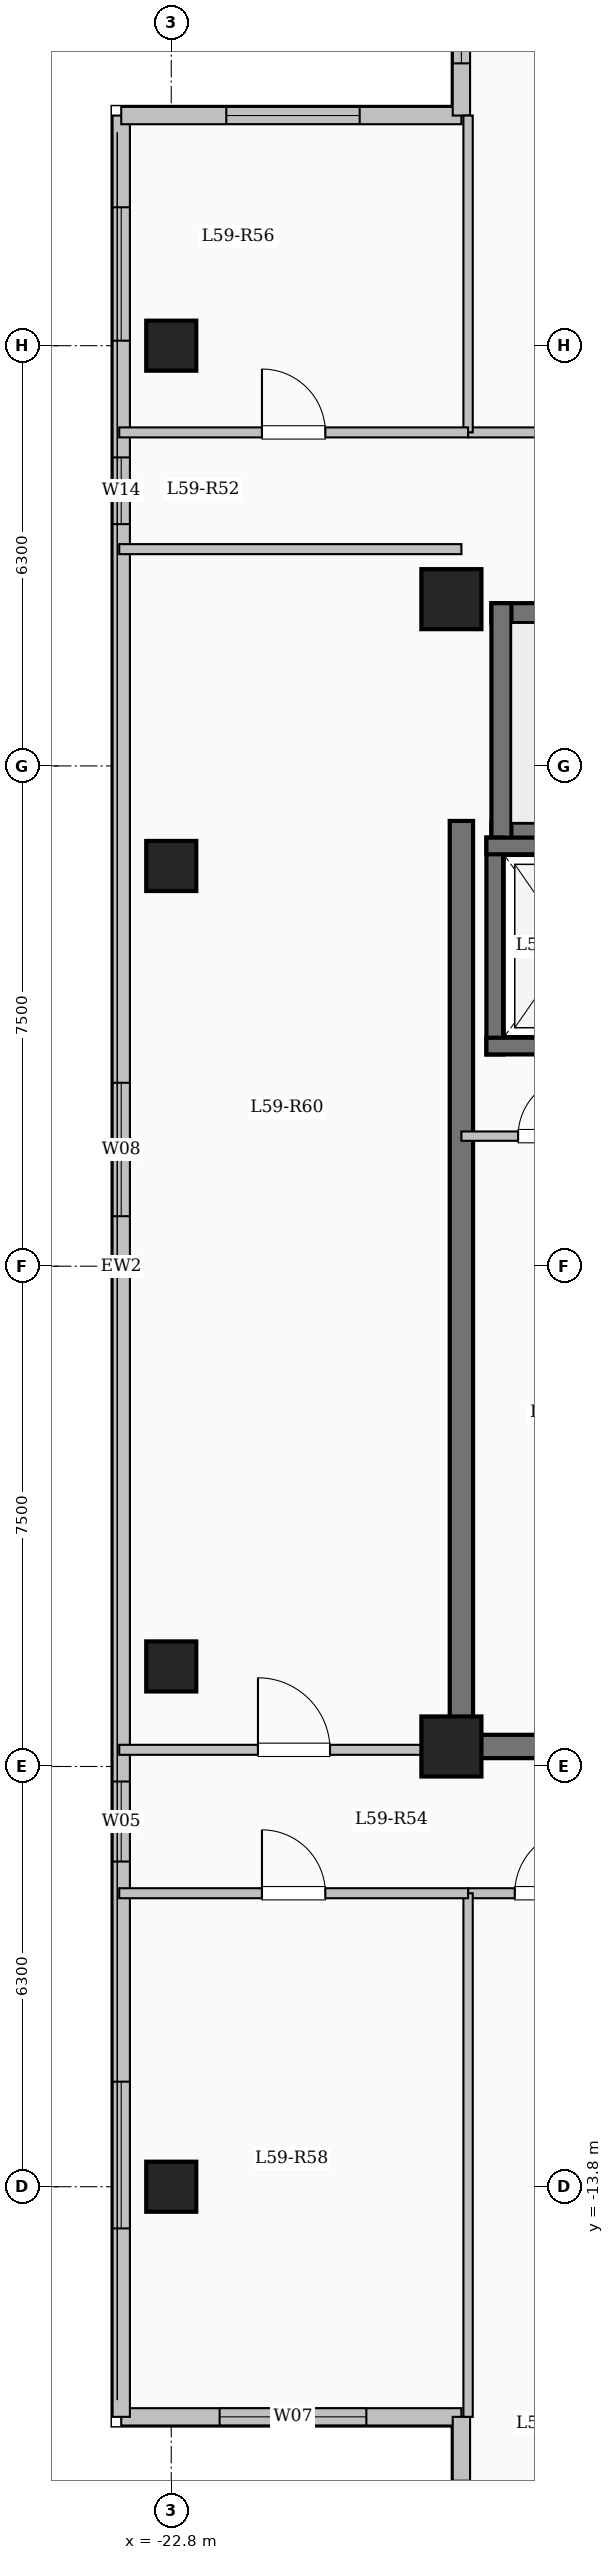
"""IFC4 building model, lengths in metres.
Left out: names, types, materials, properties, quantities, classifications, styles, units other than length and angle.
Written with IfcOpenShell. Run it as: python <this file> out.ifc"""

import sys

from ifc_helpers import new_model, si_unit, direction, frame, frame_2d, origin, origin_2d, place, context, subcontext, project, spatial, rectangle, extrude, element, fill, save


model = new_model("IFC4")
c1 = context("Model", 3, precision=1e-05, world=origin(), true_north=direction((0.0, 1.0)))
c2 = subcontext(c1, "Body", "Model", "MODEL_VIEW")
j1 = project(units=[si_unit("LENGTHUNIT", "METRE"), si_unit("PLANEANGLEUNIT", "RADIAN")], contexts=[c1])
p1 = place(None, origin())
s1 = spatial("IfcSite", under=j1, at=p1, CompositionType="ELEMENT")
p2 = place(p1, origin())
s2 = spatial("IfcBuilding", under=s1, at=p2, CompositionType="ELEMENT")
p3 = place(p2, frame((0.0, 0.0, 217.05)))
s3 = spatial("IfcBuildingStorey", under=s2, at=p3, CompositionType="ELEMENT", Elevation=217.05)
for number, where, z_axis, x_axis in (
    (1, (-18.6, -7.2, 0.0), (0.0, 0.0, 1.0), (1.0, 0.0, 0.0)),
    (2, (-18.6, 10.0, 0.0), (0.0, 0.0, 1.0), (1.0, 0.0, 0.0)),
):
    element("IfcColumn", number, at=place(p3, frame(where, z_axis=z_axis, x_axis=x_axis)), inside=s3, PredefinedType="COLUMN", context=c2, shape_type="SweptSolid", body=[
        extrude(rectangle(XDim=0.9, YDim=0.9, at=origin_2d()), origin(), (0.0, 0.0, 1.0), 3.35),
    ])
for number, where, z_axis, x_axis in (
    (3, (-22.8, -13.8, 0.0), (0.0, 0.0, 1.0), (1.0, 0.0, 0.0)),
    (4, (-22.8, -6.0, 0.0), (0.0, 0.0, 1.0), (1.0, 0.0, 0.0)),
    (5, (-22.8, 6.0, 0.0), (0.0, 0.0, 1.0), (1.0, 0.0, 0.0)),
    (6, (-22.8, 13.8, 0.0), (0.0, 0.0, 1.0), (1.0, 0.0, 0.0)),
):
    element("IfcColumn", number, at=place(p3, frame(where, z_axis=z_axis, x_axis=x_axis)), inside=s3, PredefinedType="COLUMN", context=c2, shape_type="SweptSolid", body=[
        extrude(rectangle(XDim=0.75, YDim=0.75, at=origin_2d()), origin(), (0.0, 0.0, 1.0), 3.35),
    ])
p4 = place(p3, frame((-18.45, -17.25, 0.0), z_axis=(0.0, 0.0, 1.0), x_axis=(-1.0, 0.0, 0.0)))
e7 = element("IfcWall", 7, at=p4, inside=s3, PredefinedType="SOLIDWALL", context=c2, shape_type="SweptSolid", body=[
    extrude(rectangle(XDim=5.1, YDim=0.26, at=frame_2d((2.55, 0.0))), origin(), (0.0, 0.0, 1.0), 3.1),
])
p5 = place(p4, frame((1.425, 0.0, 0.9)))
e8 = element("IfcOpeningElement", 8, at=p5, cuts=e7, PredefinedType="OPENING", context=c2, shape_type="SweptSolid", body=[
    extrude(rectangle(XDim=2.2, YDim=1.75, at=frame_2d((1.1, 0.875))), frame((0.0, 0.14, 0.0), z_axis=(0.0, -1.0, 0.0), x_axis=(1.0, 0.0, 0.0)), (0.0, 0.0, 1.0), 0.28),
])
p6 = place(p3, frame((-23.55, -17.25, 0.0), z_axis=(0.0, 0.0, 1.0), x_axis=(0.0, 1.0, 0.0)))
e9 = element("IfcWall", 9, at=p6, inside=s3, PredefinedType="SOLIDWALL", context=c2, shape_type="SweptSolid", body=[
    extrude(rectangle(XDim=34.5, YDim=0.26, at=frame_2d((17.25, 0.0))), origin(), (0.0, 0.0, 1.0), 3.1),
])
p7 = place(p6, frame((2.825, 0.0, 0.9)))
e10 = element("IfcOpeningElement", 10, at=p7, cuts=e9, PredefinedType="OPENING", context=c2, shape_type="SweptSolid", body=[
    extrude(rectangle(XDim=2.2, YDim=1.75, at=frame_2d((1.1, 0.875))), frame((0.0, 0.14, 0.0), z_axis=(0.0, -1.0, 0.0), x_axis=(1.0, 0.0, 0.0)), (0.0, 0.0, 1.0), 0.28),
])
p8 = place(p6, frame((8.325, 0.0, 0.95)))
e11 = element("IfcOpeningElement", 11, at=p8, cuts=e9, PredefinedType="OPENING", context=c2, shape_type="SweptSolid", body=[
    extrude(rectangle(XDim=1.2, YDim=1.5, at=frame_2d((0.6, 0.75))), frame((0.0, 0.14, 0.0), z_axis=(0.0, -1.0, 0.0), x_axis=(1.0, 0.0, 0.0)), (0.0, 0.0, 1.0), 0.28),
])
p9 = place(p6, frame((18.0, 0.0, 0.9)))
e12 = element("IfcOpeningElement", 12, at=p9, cuts=e9, PredefinedType="OPENING", context=c2, shape_type="SweptSolid", body=[
    extrude(rectangle(XDim=2.0, YDim=1.7, at=frame_2d((1.0, 0.85))), frame((0.0, 0.14, 0.0), z_axis=(0.0, -1.0, 0.0), x_axis=(1.0, 0.0, 0.0)), (0.0, 0.0, 1.0), 0.28),
])
p10 = place(p6, frame((28.375, 0.0, 0.95)))
e13 = element("IfcOpeningElement", 13, at=p10, cuts=e9, PredefinedType="OPENING", context=c2, shape_type="SweptSolid", body=[
    extrude(rectangle(XDim=1.0, YDim=1.5, at=frame_2d((0.5, 0.75))), frame((0.0, 0.14, 0.0), z_axis=(0.0, -1.0, 0.0), x_axis=(1.0, 0.0, 0.0)), (0.0, 0.0, 1.0), 0.28),
])
p11 = place(p6, frame((31.125, 0.0, 0.9)))
e14 = element("IfcOpeningElement", 14, at=p11, cuts=e9, PredefinedType="OPENING", context=c2, shape_type="SweptSolid", body=[
    extrude(rectangle(XDim=2.0, YDim=1.7, at=frame_2d((1.0, 0.85))), frame((0.0, 0.14, 0.0), z_axis=(0.0, -1.0, 0.0), x_axis=(1.0, 0.0, 0.0)), (0.0, 0.0, 1.0), 0.28),
])
p12 = place(p3, frame((-23.55, 17.25, 0.0), z_axis=(0.0, 0.0, 1.0), x_axis=(1.0, 0.0, 0.0)))
e15 = element("IfcWall", 15, at=p12, inside=s3, PredefinedType="SOLIDWALL", context=c2, shape_type="SweptSolid", body=[
    extrude(rectangle(XDim=5.1, YDim=0.26, at=frame_2d((2.55, 0.0))), origin(), (0.0, 0.0, 1.0), 3.1),
])
p13 = place(p12, frame((1.575, 0.0, 0.9)))
e16 = element("IfcOpeningElement", 16, at=p13, cuts=e15, PredefinedType="OPENING", context=c2, shape_type="SweptSolid", body=[
    extrude(rectangle(XDim=2.0, YDim=1.7, at=frame_2d((1.0, 0.85))), frame((0.0, 0.14, 0.0), z_axis=(0.0, -1.0, 0.0), x_axis=(1.0, 0.0, 0.0)), (0.0, 0.0, 1.0), 0.28),
])
p14 = place(p3, frame((-18.45, 17.25, 0.0), z_axis=(0.0, 0.0, 1.0), x_axis=(0.0, 1.0, 0.0)))
e17 = element("IfcWall", 17, at=p14, inside=s3, PredefinedType="SOLIDWALL", context=c2, shape_type="SweptSolid", body=[
    extrude(rectangle(XDim=3.6, YDim=0.26, at=frame_2d((1.8, 0.0))), origin(), (0.0, 0.0, 1.0), 3.1),
])
p15 = place(p14, frame((0.782, 0.0, 0.9)))
e18 = element("IfcOpeningElement", 18, at=p15, cuts=e17, PredefinedType="OPENING", context=c2, shape_type="SweptSolid", body=[
    extrude(rectangle(XDim=2.0, YDim=1.7, at=frame_2d((1.0, 0.85))), frame((0.0, 0.14, 0.0), z_axis=(0.0, -1.0, 0.0), x_axis=(1.0, 0.0, 0.0)), (0.0, 0.0, 1.0), 0.28),
])
p16 = place(p3, frame((-18.45, -20.85, 0.0), z_axis=(0.0, 0.0, 1.0), x_axis=(0.0, 1.0, 0.0)))
e19 = element("IfcWall", 19, at=p16, inside=s3, PredefinedType="SOLIDWALL", context=c2, shape_type="SweptSolid", body=[
    extrude(rectangle(XDim=3.6, YDim=0.26, at=frame_2d((1.8, 0.0))), origin(), (0.0, 0.0, 1.0), 3.1),
])
p17 = place(p16, frame((0.992, 0.0, 0.9)))
e20 = element("IfcOpeningElement", 20, at=p17, cuts=e19, PredefinedType="OPENING", context=c2, shape_type="SweptSolid", body=[
    extrude(rectangle(XDim=1.65, YDim=1.6, at=frame_2d((0.825, 0.8))), frame((0.0, 0.14, 0.0), z_axis=(0.0, -1.0, 0.0), x_axis=(1.0, 0.0, 0.0)), (0.0, 0.0, 1.0), 0.28),
])
p18 = place(p3, frame((-18.0, 9.79, 0.0), z_axis=(0.0, 0.0, 1.0), x_axis=(1.0, 0.0, 0.0)))
e21 = element("IfcWall", 21, at=p18, inside=s3, PredefinedType="SHEAR", context=c2, shape_type="SweptSolid", body=[
    extrude(rectangle(XDim=8.0, YDim=0.3, at=frame_2d((4.0, 0.0))), origin(), (0.0, 0.0, 1.0), 3.35),
])
p19 = place(p3, frame((-18.0, 6.5, 0.0), z_axis=(0.0, 0.0, 1.0), x_axis=(1.0, 0.0, 0.0)))
e22 = element("IfcWall", 22, at=p19, inside=s3, PredefinedType="SHEAR", context=c2, shape_type="SweptSolid", body=[
    extrude(rectangle(XDim=8.0, YDim=0.3, at=frame_2d((4.0, 0.0))), origin(), (0.0, 0.0, 1.0), 3.35),
])
p20 = place(p19, frame((6.45, 0.0, 0.0)))
e23 = element("IfcOpeningElement", 23, at=p20, cuts=e22, PredefinedType="OPENING", context=c2, shape_type="SweptSolid", body=[
    extrude(rectangle(XDim=1.0, YDim=2.15, at=frame_2d((0.5, 1.075))), frame((0.0, 0.16, 0.0), z_axis=(0.0, -1.0, 0.0), x_axis=(1.0, 0.0, 0.0)), (0.0, 0.0, 1.0), 0.32),
])
p21 = place(p3, frame((-17.85, 6.35, 0.0), z_axis=(0.0, 0.0, 1.0), x_axis=(0.0, 1.0, 0.0)))
e24 = element("IfcWall", 24, at=p21, inside=s3, PredefinedType="SHEAR", context=c2, shape_type="SweptSolid", body=[
    extrude(rectangle(XDim=3.59, YDim=0.3, at=frame_2d((1.795, 0.0))), origin(), (0.0, 0.0, 1.0), 3.35),
])
p22 = place(p3, frame((-17.95, 3.175, 0.0), z_axis=(0.0, 0.0, 1.0), x_axis=(0.0, 1.0, 0.0)))
e25 = element("IfcWall", 25, at=p22, inside=s3, PredefinedType="SHEAR", context=c2, shape_type="SweptSolid", body=[
    extrude(rectangle(XDim=3.25, YDim=0.25, at=frame_2d((1.625, 0.0))), origin(), (0.0, 0.0, 1.0), 3.35),
])
for number, where, z_axis, x_axis in (
    (26, (-18.075, 3.3, 0.0), (0.0, 0.0, 1.0), (1.0, 0.0, 0.0)),
    (27, (-18.075, 6.3, 0.0), (0.0, 0.0, 1.0), (1.0, 0.0, 0.0)),
):
    element("IfcWall", number, at=place(p3, frame(where, z_axis=z_axis, x_axis=x_axis)), inside=s3, PredefinedType="SHEAR", context=c2, shape_type="SweptSolid", body=[
        extrude(rectangle(XDim=2.55, YDim=0.25, at=frame_2d((1.275, 0.0))), origin(), (0.0, 0.0, 1.0), 3.35),
    ])
p23 = place(p3, frame((-18.45, -7.375, 0.0), z_axis=(0.0, 0.0, 1.0), x_axis=(0.0, 1.0, 0.0)))
e28 = element("IfcWall", 28, at=p23, inside=s3, PredefinedType="SHEAR", context=c2, shape_type="SweptSolid", body=[
    extrude(rectangle(XDim=14.05, YDim=0.35, at=frame_2d((7.025, 0.0))), origin(), (0.0, 0.0, 1.0), 3.35),
])
p24 = place(p3, frame((-18.625, -7.2, 0.0), z_axis=(0.0, 0.0, 1.0), x_axis=(1.0, 0.0, 0.0)))
e29 = element("IfcWall", 29, at=p24, inside=s3, PredefinedType="SHEAR", context=c2, shape_type="SweptSolid", body=[
    extrude(rectangle(XDim=6.0, YDim=0.35, at=frame_2d((3.0, 0.0))), origin(), (0.0, 0.0, 1.0), 3.35),
])
p25 = place(p24, frame((1.725, 0.0, 0.0)))
e30 = element("IfcOpeningElement", 30, at=p25, cuts=e29, PredefinedType="OPENING", context=c2, shape_type="SweptSolid", body=[
    extrude(rectangle(XDim=1.12, YDim=2.15, at=frame_2d((0.56, 1.075))), frame((0.0, 0.185, 0.0), z_axis=(0.0, -1.0, 0.0), x_axis=(1.0, 0.0, 0.0)), (0.0, 0.0, 1.0), 0.37),
])
p26 = place(p3, frame((-18.45, 1.95, 0.0), z_axis=(0.0, 0.0, 1.0), x_axis=(1.0, 0.0, 0.0)))
e31 = element("IfcWall", 31, at=p26, inside=s3, PredefinedType="PARTITIONING", context=c2, shape_type="SweptSolid", body=[
    extrude(rectangle(XDim=3.15, YDim=0.14, at=frame_2d((1.575, 0.0))), origin(), (0.0, 0.0, 1.0), 3.1),
])
p27 = place(p26, frame((0.85, 0.0, 0.0)))
e32 = element("IfcOpeningElement", 32, at=p27, cuts=e31, PredefinedType="OPENING", context=c2, shape_type="SweptSolid", body=[
    extrude(rectangle(XDim=0.9, YDim=2.08, at=frame_2d((0.45, 1.04))), frame((0.0, 0.08, 0.0), z_axis=(0.0, -1.0, 0.0), x_axis=(1.0, 0.0, 0.0)), (0.0, 0.0, 1.0), 0.16),
])
p28 = place(p3, frame((-18.35, 12.5, 0.0), z_axis=(0.0, 0.0, 1.0), x_axis=(1.0, 0.0, 0.0)))
e33 = element("IfcWall", 33, at=p28, inside=s3, PredefinedType="PARTITIONING", context=c2, shape_type="SweptSolid", body=[
    extrude(rectangle(XDim=14.5, YDim=0.15, at=frame_2d((7.25, 0.0))), origin(), (0.0, 0.0, 1.0), 3.1),
])
p29 = place(p28, frame((2.076, 0.0, 0.0)))
e34 = element("IfcOpeningElement", 34, at=p29, cuts=e33, PredefinedType="OPENING", context=c2, shape_type="SweptSolid", body=[
    extrude(rectangle(XDim=0.95, YDim=2.15, at=frame_2d((0.475, 1.075))), frame((0.0, 0.085, 0.0), z_axis=(0.0, -1.0, 0.0), x_axis=(1.0, 0.0, 0.0)), (0.0, 0.0, 1.0), 0.17),
])
p30 = place(p28, frame((7.269, 0.0, 0.0)))
e35 = element("IfcOpeningElement", 35, at=p30, cuts=e33, PredefinedType="OPENING", context=c2, shape_type="SweptSolid", body=[
    extrude(rectangle(XDim=0.95, YDim=2.15, at=frame_2d((0.475, 1.075))), frame((0.0, 0.085, 0.0), z_axis=(0.0, -1.0, 0.0), x_axis=(1.0, 0.0, 0.0)), (0.0, 0.0, 1.0), 0.17),
])
p31 = place(p28, frame((11.888, 0.0, 0.0)))
e36 = element("IfcOpeningElement", 36, at=p31, cuts=e33, PredefinedType="OPENING", context=c2, shape_type="SweptSolid", body=[
    extrude(rectangle(XDim=0.95, YDim=2.15, at=frame_2d((0.475, 1.075))), frame((0.0, 0.085, 0.0), z_axis=(0.0, -1.0, 0.0), x_axis=(1.0, 0.0, 0.0)), (0.0, 0.0, 1.0), 0.17),
])
p32 = place(p3, frame((-18.35, -9.4, 0.0), z_axis=(0.0, 0.0, 1.0), x_axis=(1.0, 0.0, 0.0)))
e37 = element("IfcWall", 37, at=p32, inside=s3, PredefinedType="PARTITIONING", context=c2, shape_type="SweptSolid", body=[
    extrude(rectangle(XDim=9.8, YDim=0.15, at=frame_2d((4.9, 0.0))), origin(), (0.0, 0.0, 1.0), 3.1),
])
p33 = place(p32, frame((0.7, 0.0, 0.0)))
e38 = element("IfcOpeningElement", 38, at=p33, cuts=e37, PredefinedType="OPENING", context=c2, shape_type="SweptSolid", body=[
    extrude(rectangle(XDim=0.96, YDim=2.15, at=frame_2d((0.48, 1.075))), frame((0.0, 0.085, 0.0), z_axis=(0.0, -1.0, 0.0), x_axis=(1.0, 0.0, 0.0)), (0.0, 0.0, 1.0), 0.17),
])
p34 = place(p32, frame((5.575, 0.0, 0.0)))
e39 = element("IfcOpeningElement", 39, at=p34, cuts=e37, PredefinedType="OPENING", context=c2, shape_type="SweptSolid", body=[
    extrude(rectangle(XDim=0.96, YDim=2.15, at=frame_2d((0.48, 1.075))), frame((0.0, 0.085, 0.0), z_axis=(0.0, -1.0, 0.0), x_axis=(1.0, 0.0, 0.0)), (0.0, 0.0, 1.0), 0.17),
])
p35 = place(p3, frame((-23.58, -7.25, 0.0), z_axis=(0.0, 0.0, 1.0), x_axis=(1.0, 0.0, 0.0)))
e40 = element("IfcWall", 40, at=p35, inside=s3, PredefinedType="PARTITIONING", context=c2, shape_type="SweptSolid", body=[
    extrude(rectangle(XDim=5.13, YDim=0.15, at=frame_2d((2.565, 0.0))), origin(), (0.0, 0.0, 1.0), 3.1),
])
p36 = place(p35, frame((2.08, 0.0, 0.0)))
e41 = element("IfcOpeningElement", 41, at=p36, cuts=e40, PredefinedType="OPENING", context=c2, shape_type="SweptSolid", body=[
    extrude(rectangle(XDim=1.08, YDim=2.15, at=frame_2d((0.54, 1.075))), frame((0.0, 0.085, 0.0), z_axis=(0.0, -1.0, 0.0), x_axis=(1.0, 0.0, 0.0)), (0.0, 0.0, 1.0), 0.17),
])
p37 = place(p3, frame((-23.58, 10.75, 0.0), z_axis=(0.0, 0.0, 1.0), x_axis=(1.0, 0.0, 0.0)))
e42 = element("IfcWall", 42, at=p37, inside=s3, PredefinedType="PARTITIONING", context=c2, shape_type="SweptSolid", body=[
    extrude(rectangle(XDim=5.13, YDim=0.15, at=frame_2d((2.565, 0.0))), origin(), (0.0, 0.0, 1.0), 3.1),
])
p38 = place(p3, frame((-18.35, -17.25, 0.0), z_axis=(0.0, 0.0, 1.0), x_axis=(0.0, 1.0, 0.0)))
e43 = element("IfcWall", 43, at=p38, inside=s3, PredefinedType="PARTITIONING", context=c2, shape_type="SweptSolid", body=[
    extrude(rectangle(XDim=7.85, YDim=0.14, at=frame_2d((3.925, 0.0))), origin(), (0.0, 0.0, 1.0), 3.1),
])
p39 = place(p3, frame((-18.35, 12.5, 0.0), z_axis=(0.0, 0.0, 1.0), x_axis=(0.0, 1.0, 0.0)))
e44 = element("IfcWall", 44, at=p39, inside=s3, PredefinedType="PARTITIONING", context=c2, shape_type="SweptSolid", body=[
    extrude(rectangle(XDim=4.75, YDim=0.14, at=frame_2d((2.375, 0.0))), origin(), (0.0, 0.0, 1.0), 3.1),
])
p40 = place(p3, frame((-23.58, 12.5, 0.0), z_axis=(0.0, 0.0, 1.0), x_axis=(1.0, 0.0, 0.0)))
e45 = element("IfcWall", 45, at=p40, inside=s3, PredefinedType="PARTITIONING", context=c2, shape_type="SweptSolid", body=[
    extrude(rectangle(XDim=5.23, YDim=0.15, at=frame_2d((2.615, 0.0))), origin(), (0.0, 0.0, 1.0), 3.1),
])
p41 = place(p40, frame((2.14, 0.0, 0.0)))
e46 = element("IfcOpeningElement", 46, at=p41, cuts=e45, PredefinedType="OPENING", context=c2, shape_type="SweptSolid", body=[
    extrude(rectangle(XDim=0.95, YDim=2.15, at=frame_2d((0.475, 1.075))), frame((0.0, 0.085, 0.0), z_axis=(0.0, -1.0, 0.0), x_axis=(1.0, 0.0, 0.0)), (0.0, 0.0, 1.0), 0.17),
])
p42 = place(p3, frame((-23.58, -9.4, 0.0), z_axis=(0.0, 0.0, 1.0), x_axis=(1.0, 0.0, 0.0)))
e47 = element("IfcWall", 47, at=p42, inside=s3, PredefinedType="PARTITIONING", context=c2, shape_type="SweptSolid", body=[
    extrude(rectangle(XDim=5.23, YDim=0.15, at=frame_2d((2.615, 0.0))), origin(), (0.0, 0.0, 1.0), 3.1),
])
p43 = place(p42, frame((2.14, 0.0, 0.0)))
e48 = element("IfcOpeningElement", 48, at=p43, cuts=e47, PredefinedType="OPENING", context=c2, shape_type="SweptSolid", body=[
    extrude(rectangle(XDim=0.95, YDim=2.15, at=frame_2d((0.475, 1.075))), frame((0.0, 0.085, 0.0), z_axis=(0.0, -1.0, 0.0), x_axis=(1.0, 0.0, 0.0)), (0.0, 0.0, 1.0), 0.17),
])
p44 = place(p5, origin())
e49 = element("IfcWindow", 49, at=p44, inside=s3, PartitioningType="SINGLE_PANEL", PredefinedType="WINDOW", context=c2, shape_type="SweptSolid", body=[
    extrude(rectangle(XDim=2.2, YDim=1.75, at=frame_2d((1.1, 0.875))), frame((0.0, 0.03, 0.0), z_axis=(0.0, -1.0, 0.0), x_axis=(1.0, 0.0, 0.0)), (0.0, 0.0, 1.0), 0.06),
])
fill(e8, e49)
p45 = place(p7, origin())
e50 = element("IfcWindow", 50, at=p45, inside=s3, PartitioningType="SINGLE_PANEL", PredefinedType="WINDOW", context=c2, shape_type="SweptSolid", body=[
    extrude(rectangle(XDim=2.2, YDim=1.75, at=frame_2d((1.1, 0.875))), frame((0.0, 0.03, 0.0), z_axis=(0.0, -1.0, 0.0), x_axis=(1.0, 0.0, 0.0)), (0.0, 0.0, 1.0), 0.06),
])
fill(e10, e50)
p46 = place(p8, origin())
e51 = element("IfcWindow", 51, at=p46, inside=s3, PartitioningType="SINGLE_PANEL", PredefinedType="WINDOW", context=c2, shape_type="SweptSolid", body=[
    extrude(rectangle(XDim=1.2, YDim=1.5, at=frame_2d((0.6, 0.75))), frame((0.0, 0.03, 0.0), z_axis=(0.0, -1.0, 0.0), x_axis=(1.0, 0.0, 0.0)), (0.0, 0.0, 1.0), 0.06),
])
fill(e11, e51)
p47 = place(p9, origin())
e52 = element("IfcWindow", 52, at=p47, inside=s3, PartitioningType="SINGLE_PANEL", PredefinedType="WINDOW", context=c2, shape_type="SweptSolid", body=[
    extrude(rectangle(XDim=2.0, YDim=1.7, at=frame_2d((1.0, 0.85))), frame((0.0, 0.03, 0.0), z_axis=(0.0, -1.0, 0.0), x_axis=(1.0, 0.0, 0.0)), (0.0, 0.0, 1.0), 0.06),
])
fill(e12, e52)
p48 = place(p10, origin())
e53 = element("IfcWindow", 53, at=p48, inside=s3, PartitioningType="SINGLE_PANEL", PredefinedType="WINDOW", context=c2, shape_type="SweptSolid", body=[
    extrude(rectangle(XDim=1.0, YDim=1.5, at=frame_2d((0.5, 0.75))), frame((0.0, 0.03, 0.0), z_axis=(0.0, -1.0, 0.0), x_axis=(1.0, 0.0, 0.0)), (0.0, 0.0, 1.0), 0.06),
])
fill(e13, e53)
p49 = place(p11, origin())
e54 = element("IfcWindow", 54, at=p49, inside=s3, PartitioningType="SINGLE_PANEL", PredefinedType="WINDOW", context=c2, shape_type="SweptSolid", body=[
    extrude(rectangle(XDim=2.0, YDim=1.7, at=frame_2d((1.0, 0.85))), frame((0.0, 0.03, 0.0), z_axis=(0.0, -1.0, 0.0), x_axis=(1.0, 0.0, 0.0)), (0.0, 0.0, 1.0), 0.06),
])
fill(e14, e54)
p50 = place(p13, origin())
e55 = element("IfcWindow", 55, at=p50, inside=s3, PartitioningType="SINGLE_PANEL", PredefinedType="WINDOW", context=c2, shape_type="SweptSolid", body=[
    extrude(rectangle(XDim=2.0, YDim=1.7, at=frame_2d((1.0, 0.85))), frame((0.0, 0.03, 0.0), z_axis=(0.0, -1.0, 0.0), x_axis=(1.0, 0.0, 0.0)), (0.0, 0.0, 1.0), 0.06),
])
fill(e16, e55)
p51 = place(p15, origin())
e56 = element("IfcWindow", 56, at=p51, inside=s3, PartitioningType="SINGLE_PANEL", PredefinedType="WINDOW", context=c2, shape_type="SweptSolid", body=[
    extrude(rectangle(XDim=2.0, YDim=1.7, at=frame_2d((1.0, 0.85))), frame((0.0, 0.03, 0.0), z_axis=(0.0, -1.0, 0.0), x_axis=(1.0, 0.0, 0.0)), (0.0, 0.0, 1.0), 0.06),
])
fill(e18, e56)
p52 = place(p27, origin())
e57 = element("IfcDoor", 57, at=p52, inside=s3, OperationType="SINGLE_SWING_RIGHT", PredefinedType="DOOR", context=c2, shape_type="SweptSolid", body=[
    extrude(rectangle(XDim=0.9, YDim=2.08, at=frame_2d((0.45, 1.04))), frame((0.0, 0.025, 0.0), z_axis=(0.0, -1.0, 0.0), x_axis=(1.0, 0.0, 0.0)), (0.0, 0.0, 1.0), 0.05),
])
fill(e32, e57)
p53 = place(p33, origin())
e58 = element("IfcDoor", 58, at=p53, inside=s3, OperationType="SINGLE_SWING_RIGHT", PredefinedType="DOOR", context=c2, shape_type="SweptSolid", body=[
    extrude(rectangle(XDim=0.96, YDim=2.15, at=frame_2d((0.48, 1.075))), frame((0.0, 0.025, 0.0), z_axis=(0.0, -1.0, 0.0), x_axis=(1.0, 0.0, 0.0)), (0.0, 0.0, 1.0), 0.05),
])
fill(e38, e58)
p54 = place(p41, origin())
e59 = element("IfcDoor", 59, at=p54, inside=s3, OperationType="SINGLE_SWING_LEFT", PredefinedType="DOOR", context=c2, shape_type="SweptSolid", body=[
    extrude(rectangle(XDim=0.95, YDim=2.15, at=frame_2d((0.475, 1.075))), frame((0.0, 0.025, 0.0), z_axis=(0.0, -1.0, 0.0), x_axis=(1.0, 0.0, 0.0)), (0.0, 0.0, 1.0), 0.05),
])
fill(e46, e59)
p55 = place(p43, origin())
e60 = element("IfcDoor", 60, at=p55, inside=s3, OperationType="SINGLE_SWING_LEFT", PredefinedType="DOOR", context=c2, shape_type="SweptSolid", body=[
    extrude(rectangle(XDim=0.95, YDim=2.15, at=frame_2d((0.475, 1.075))), frame((0.0, 0.025, 0.0), z_axis=(0.0, -1.0, 0.0), x_axis=(1.0, 0.0, 0.0)), (0.0, 0.0, 1.0), 0.05),
])
fill(e48, e60)
p56 = place(p36, origin())
e61 = element("IfcDoor", 61, at=p56, inside=s3, OperationType="SINGLE_SWING_LEFT", PredefinedType="DOOR", context=c2, shape_type="SweptSolid", body=[
    extrude(rectangle(XDim=1.08, YDim=2.15, at=frame_2d((0.54, 1.075))), frame((0.0, 0.025, 0.0), z_axis=(0.0, -1.0, 0.0), x_axis=(1.0, 0.0, 0.0)), (0.0, 0.0, 1.0), 0.05),
])
fill(e41, e61)
save(model, sys.argv[1])
